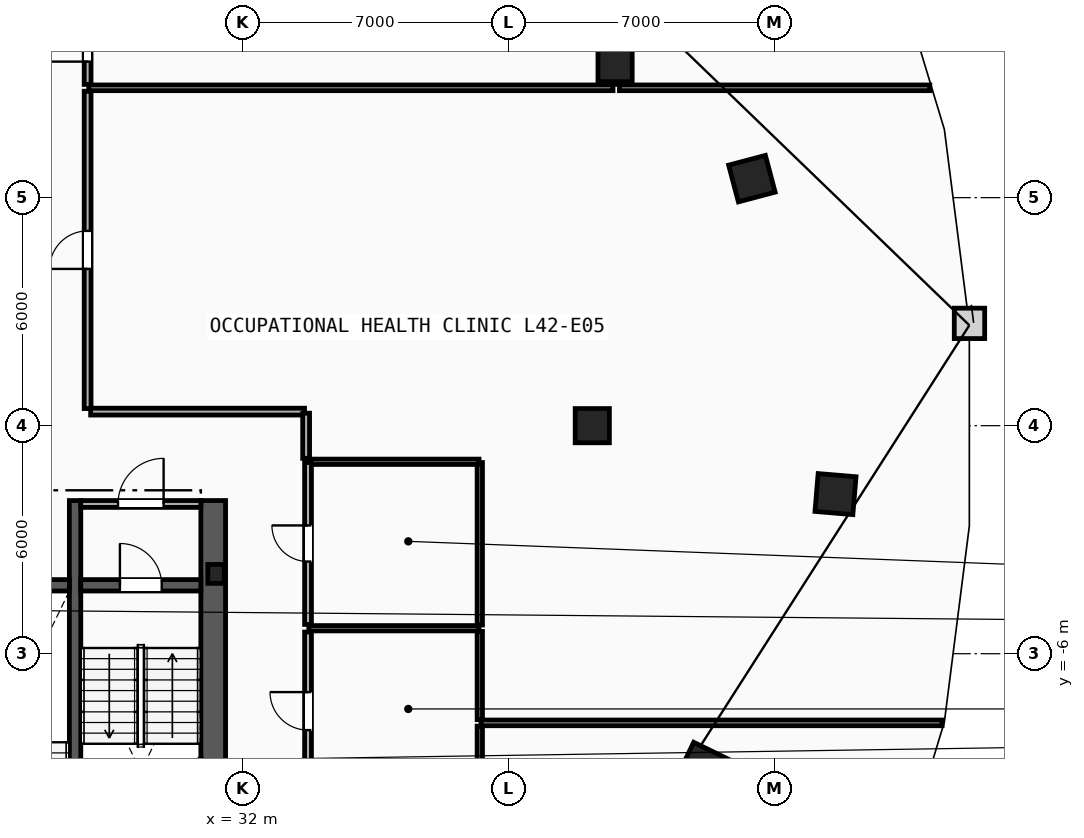
"""IFC4 building model, lengths in metres.
Left out: names, types, materials, properties, quantities, classifications, styles, units other than length and angle.
Written with IfcOpenShell. Run it as: python <this file> out.ifc"""

import sys

from ifc_helpers import new_model, si_unit, direction, frame, frame_2d, origin, origin_2d, place, context, subcontext, project, spatial, rectangle, i_section, extrude, element, fill, save


model = new_model("IFC4")
c1 = context("Model", 3, precision=1e-05, world=origin(), true_north=direction((0.0, 1.0)))
c2 = subcontext(c1, "Body", "Model", "MODEL_VIEW")
j1 = project(units=[si_unit("LENGTHUNIT", "METRE"), si_unit("PLANEANGLEUNIT", "RADIAN")], contexts=[c1])
p1 = place(None, origin())
s1 = spatial("IfcSite", under=j1, at=p1, CompositionType="ELEMENT")
p2 = place(p1, origin())
s2 = spatial("IfcBuilding", under=s1, at=p2, CompositionType="ELEMENT")
p3 = place(p2, frame((0.0, 0.0, 162.0)))
s3 = spatial("IfcBuildingStorey", under=s2, at=p3, CompositionType="ELEMENT", Elevation=162.0)
p4 = place(p3, frame((31.3, -3.9, 0.0), z_axis=(0.0, 0.0, 1.0), x_axis=(1.0, 0.0, 0.0)))
e1 = element("IfcColumn", 1, at=p4, inside=s3, PredefinedType="COLUMN", context=c2, shape_type="SweptSolid", body=[
    extrude(i_section(OverallWidth=0.432, OverallDepth=0.498, WebThickness=0.056, FlangeThickness=0.089, FilletRadius=0.018, at=origin_2d()), origin(), (0.0, 0.0, 1.0), 3.6),
])
for number, where, z_axis, x_axis in (
    (2, (41.2, 0.0, 0.0), (0.0, 0.0, 1.0), (1.0, 0.0, 0.0)),
    (3, (41.8, 9.5, 0.0), (0.0, 0.0, 1.0), (1.0, 0.0, 0.0)),
):
    element("IfcColumn", number, at=place(p3, frame(where, z_axis=z_axis, x_axis=x_axis)), inside=s3, PredefinedType="COLUMN", context=c2, shape_type="SweptSolid", body=[
        extrude(rectangle(XDim=0.9, YDim=0.9, at=origin_2d()), origin(), (0.0, 0.0, 1.0), 3.6),
    ])
for number, where, z_axis, x_axis in (
    (4, (44.1, -9.0, 0.0), (0.0, 0.0, 1.0), (0.437, 0.899, 0.0)),
    (5, (47.6, -1.8, 0.0), (0.0, 0.0, 1.0), (0.084, 0.997, 0.0)),
    (6, (45.4, 6.5, 0.0), (0.0, 0.0, 1.0), (-0.256, 0.967, 0.0)),
):
    element("IfcColumn", number, at=place(p3, frame(where, z_axis=z_axis, x_axis=x_axis)), inside=s3, PredefinedType="COLUMN", context=c2, shape_type="SweptSolid", body=[
        extrude(rectangle(XDim=1.0, YDim=1.0, at=origin_2d()), origin(), (0.0, 0.0, 1.0), 3.6),
    ])
p5 = place(p3, frame((31.225, -15.3, 0.0), z_axis=(0.0, 0.0, 1.0), x_axis=(0.0, 1.0, 0.0)))
e7 = element("IfcWall", 7, at=p5, inside=s3, PredefinedType="SHEAR", context=c2, shape_type="SweptSolid", body=[
    extrude(rectangle(XDim=13.33, YDim=0.65, at=frame_2d((6.665, 0.0))), origin(), (0.0, 0.0, 1.0), 3.36),
])
p6 = place(p3, frame((27.59, -12.65, 0.0), z_axis=(0.0, 0.0, 1.0), x_axis=(0.0, 1.0, 0.0)))
e8 = element("IfcWall", 8, at=p6, inside=s3, PredefinedType="SHEAR", context=c2, shape_type="SweptSolid", body=[
    extrude(rectangle(XDim=10.68, YDim=0.3, at=frame_2d((5.34, 0.0))), origin(), (0.0, 0.0, 1.0), 3.36),
])
p7 = place(p3, frame((27.74, -4.2, 0.0), z_axis=(0.0, 0.0, 1.0), x_axis=(1.0, 0.0, 0.0)))
e9 = element("IfcWall", 9, at=p7, inside=s3, PredefinedType="SHEAR", context=c2, shape_type="SweptSolid", body=[
    extrude(rectangle(XDim=3.16, YDim=0.3, at=frame_2d((1.58, 0.0))), origin(), (0.0, 0.0, 1.0), 3.36),
])
p8 = place(p7, frame((1.03, 0.0, 0.0)))
e10 = element("IfcOpeningElement", 10, at=p8, cuts=e9, PredefinedType="OPENING", context=c2, shape_type="SweptSolid", body=[
    extrude(rectangle(XDim=1.1, YDim=2.15, at=frame_2d((0.55, 1.075))), frame((0.0, 0.16, 0.0), z_axis=(0.0, -1.0, 0.0), x_axis=(1.0, 0.0, 0.0)), (0.0, 0.0, 1.0), 0.32),
])
p9 = place(p3, frame((24.28, -4.2, 0.0), z_axis=(0.0, 0.0, 1.0), x_axis=(1.0, 0.0, 0.0)))
e11 = element("IfcWall", 11, at=p9, inside=s3, PredefinedType="SHEAR", context=c2, shape_type="SweptSolid", body=[
    extrude(rectangle(XDim=3.16, YDim=0.3, at=frame_2d((1.58, 0.0))), origin(), (0.0, 0.0, 1.0), 3.36),
])
p10 = place(p3, frame((27.74, -2.06, 0.0), z_axis=(0.0, 0.0, 1.0), x_axis=(1.0, 0.0, 0.0)))
e12 = element("IfcWall", 12, at=p10, inside=s3, PredefinedType="PARTITIONING", context=c2, shape_type="SweptSolid", body=[
    extrude(rectangle(XDim=3.16, YDim=0.18, at=frame_2d((1.58, 0.0))), origin(), (0.0, 0.0, 1.0), 3.36),
])
p11 = place(p10, frame((0.98, 0.0, 0.0)))
e13 = element("IfcOpeningElement", 13, at=p11, cuts=e12, PredefinedType="OPENING", context=c2, shape_type="SweptSolid", body=[
    extrude(rectangle(XDim=1.2, YDim=2.15, at=frame_2d((0.6, 1.075))), frame((0.0, 0.1, 0.0), z_axis=(0.0, -1.0, 0.0), x_axis=(1.0, 0.0, 0.0)), (0.0, 0.0, 1.0), 0.2),
])
p12 = place(p3, frame((38.24, -9.59, 0.0), z_axis=(0.0, 0.0, 1.0), x_axis=(0.0, 1.0, 0.0)))
e14 = element("IfcWall", 14, at=p12, inside=s3, PredefinedType="PARTITIONING", context=c2, shape_type="SweptSolid", body=[
    extrude(rectangle(XDim=1.685, YDim=0.14, at=frame_2d((0.843, 0.0))), origin(), (0.0, 0.0, 1.0), 3.36),
])
p13 = place(p3, frame((38.24, -7.735, 0.0), z_axis=(0.0, 0.0, 1.0), x_axis=(0.0, 1.0, 0.0)))
e15 = element("IfcWall", 15, at=p13, inside=s3, PredefinedType="PARTITIONING", context=c2, shape_type="SweptSolid", body=[
    extrude(rectangle(XDim=2.32, YDim=0.14, at=frame_2d((1.16, 0.0))), origin(), (0.0, 0.0, 1.0), 3.36),
])
p14 = place(p3, frame((38.24, -5.245, 0.0), z_axis=(0.0, 0.0, 1.0), x_axis=(0.0, 1.0, 0.0)))
e16 = element("IfcWall", 16, at=p14, inside=s3, PredefinedType="PARTITIONING", context=c2, shape_type="SweptSolid", body=[
    extrude(rectangle(XDim=4.275, YDim=0.14, at=frame_2d((2.138, 0.0))), origin(), (0.0, 0.0, 1.0), 3.36),
])
for number, where, z_axis, x_axis in (
    (17, (33.74, -0.95, 0.0), (0.0, 0.0, 1.0), (1.0, 0.0, 0.0)),
    (18, (33.74, -5.33, 0.0), (0.0, 0.0, 1.0), (1.0, 0.0, 0.0)),
):
    element("IfcWall", number, at=place(p3, frame(where, z_axis=z_axis, x_axis=x_axis)), inside=s3, PredefinedType="PARTITIONING", context=c2, shape_type="SweptSolid", body=[
        extrude(rectangle(XDim=4.48, YDim=0.14, at=frame_2d((2.24, 0.0))), origin(), (0.0, 0.0, 1.0), 3.36),
    ])
p15 = place(p3, frame((33.72, -5.23, 0.0), z_axis=(0.0, 0.0, 1.0), x_axis=(0.0, 1.0, 0.0)))
e19 = element("IfcWall", 19, at=p15, inside=s3, PredefinedType="PARTITIONING", context=c2, shape_type="SweptSolid", body=[
    extrude(rectangle(XDim=4.26, YDim=0.18, at=frame_2d((2.13, 0.0))), origin(), (0.0, 0.0, 1.0), 3.36),
])
p16 = place(p15, frame((1.655, 0.0, 0.0)))
e20 = element("IfcOpeningElement", 20, at=p16, cuts=e19, PredefinedType="OPENING", context=c2, shape_type="SweptSolid", body=[
    extrude(rectangle(XDim=0.95, YDim=2.1, at=frame_2d((0.475, 1.05))), frame((0.0, 0.1, 0.0), z_axis=(0.0, -1.0, 0.0), x_axis=(1.0, 0.0, 0.0)), (0.0, 0.0, 1.0), 0.2),
])
p17 = place(p3, frame((33.72, -9.59, 0.0), z_axis=(0.0, 0.0, 1.0), x_axis=(0.0, 1.0, 0.0)))
e21 = element("IfcWall", 21, at=p17, inside=s3, PredefinedType="PARTITIONING", context=c2, shape_type="SweptSolid", body=[
    extrude(rectangle(XDim=4.16, YDim=0.18, at=frame_2d((2.08, 0.0))), origin(), (0.0, 0.0, 1.0), 3.36),
])
p18 = place(p17, frame((1.58, 0.0, 0.0)))
e22 = element("IfcOpeningElement", 22, at=p18, cuts=e21, PredefinedType="OPENING", context=c2, shape_type="SweptSolid", body=[
    extrude(rectangle(XDim=1.0, YDim=2.15, at=frame_2d((0.5, 1.075))), frame((0.0, 0.1, 0.0), z_axis=(0.0, -1.0, 0.0), x_axis=(1.0, 0.0, 0.0)), (0.0, 0.0, 1.0), 0.2),
])
p19 = place(p3, frame((27.95, 8.89, 0.0), z_axis=(0.0, 0.0, 1.0), x_axis=(1.0, 0.0, 0.0)))
e23 = element("IfcWall", 23, at=p19, inside=s3, PredefinedType="PARTITIONING", context=c2, shape_type="SweptSolid", body=[
    extrude(rectangle(XDim=13.795, YDim=0.15, at=frame_2d((6.897, 0.0))), origin(), (0.0, 0.0, 1.0), 3.36),
])
p20 = place(p3, frame((41.915, 8.89, 0.0), z_axis=(0.0, 0.0, 1.0), x_axis=(1.0, 0.0, 0.0)))
e24 = element("IfcWall", 24, at=p20, inside=s3, PredefinedType="PARTITIONING", context=c2, shape_type="SweptSolid", body=[
    extrude(rectangle(XDim=8.167, YDim=0.15, at=frame_2d((4.083, 0.0))), origin(), (0.0, 0.0, 1.0), 3.36),
])
p21 = place(p3, frame((38.27, -7.82, 0.0), z_axis=(0.0, 0.0, 1.0), x_axis=(1.0, 0.0, 0.0)))
e25 = element("IfcWall", 25, at=p21, inside=s3, PredefinedType="PARTITIONING", context=c2, shape_type="SweptSolid", body=[
    extrude(rectangle(XDim=12.136, YDim=0.15, at=frame_2d((6.068, 0.0))), origin(), (0.0, 0.0, 1.0), 3.36),
])
p22 = place(p3, frame((27.92, 0.45, 0.0), z_axis=(0.0, 0.0, 1.0), x_axis=(0.0, 1.0, 0.0)))
e26 = element("IfcWall", 26, at=p22, inside=s3, PredefinedType="PARTITIONING", context=c2, shape_type="SweptSolid", body=[
    extrude(rectangle(XDim=8.35, YDim=0.18, at=frame_2d((4.175, 0.0))), origin(), (0.0, 0.0, 1.0), 3.36),
])
p23 = place(p22, frame((3.675, 0.0, 0.0)))
e27 = element("IfcOpeningElement", 27, at=p23, cuts=e26, PredefinedType="OPENING", context=c2, shape_type="SweptSolid", body=[
    extrude(rectangle(XDim=1.0, YDim=2.15, at=frame_2d((0.5, 1.075))), frame((0.0, 0.1, 0.0), z_axis=(0.0, -1.0, 0.0), x_axis=(1.0, 0.0, 0.0)), (0.0, 0.0, 1.0), 0.2),
])
p24 = place(p3, frame((33.628, 0.37, 0.0), z_axis=(0.0, 0.0, 1.0), x_axis=(-1.0, 0.0, 0.0)))
e28 = element("IfcWall", 28, at=p24, inside=s3, PredefinedType="PARTITIONING", context=c2, shape_type="SweptSolid", body=[
    extrude(rectangle(XDim=5.628, YDim=0.18, at=frame_2d((2.814, 0.0))), origin(), (0.0, 0.0, 1.0), 3.36),
])
p25 = place(p3, frame((33.67, -0.859, 0.0), z_axis=(0.0, 0.0, 1.0), x_axis=(0.0, 1.0, 0.0)))
e29 = element("IfcWall", 29, at=p25, inside=s3, PredefinedType="PARTITIONING", context=c2, shape_type="SweptSolid", body=[
    extrude(rectangle(XDim=1.187, YDim=0.18, at=frame_2d((0.594, 0.0))), origin(), (0.0, 0.0, 1.0), 3.36),
])
p26 = place(p3, frame((27.92, 8.98, 0.0), z_axis=(0.0, 0.0, 1.0), x_axis=(0.0, 1.0, 0.0)))
e30 = element("IfcWall", 30, at=p26, inside=s3, PredefinedType="PARTITIONING", context=c2, shape_type="SweptSolid", body=[
    extrude(rectangle(XDim=2.198, YDim=0.18, at=frame_2d((1.099, 0.0))), origin(), (0.0, 0.0, 1.0), 3.36),
])
p27 = place(p26, frame((0.599, 0.0, 0.0)))
e31 = element("IfcOpeningElement", 31, at=p27, cuts=e30, PredefinedType="OPENING", context=c2, shape_type="SweptSolid", body=[
    extrude(rectangle(XDim=1.0, YDim=2.15, at=frame_2d((0.5, 1.075))), frame((0.0, 0.1, 0.0), z_axis=(0.0, -1.0, 0.0), x_axis=(1.0, 0.0, 0.0)), (0.0, 0.0, 1.0), 0.2),
])
p28 = place(p3, frame((41.83, 8.98, 0.0), z_axis=(0.0, 0.0, 1.0), x_axis=(0.0, 1.0, 0.0)))
e32 = element("IfcWall", 32, at=p28, inside=s3, PredefinedType="PARTITIONING", context=c2, shape_type="SweptSolid", body=[
    extrude(rectangle(XDim=11.638, YDim=0.125, at=frame_2d((5.819, 0.0))), origin(), (0.0, 0.0, 1.0), 2.897),
])
p29 = place(p28, frame((3.76, 0.0, 0.0)))
e33 = element("IfcOpeningElement", 33, at=p29, cuts=e32, PredefinedType="OPENING", context=c2, shape_type="SweptSolid", body=[
    extrude(rectangle(XDim=1.0, YDim=2.15, at=frame_2d((0.5, 1.075))), frame((0.0, 0.073, 0.0), z_axis=(0.0, -1.0, 0.0), x_axis=(1.0, 0.0, 0.0)), (0.0, 0.0, 1.0), 0.145),
])
p30 = place(p8, origin())
e34 = element("IfcDoor", 34, at=p30, inside=s3, OperationType="SINGLE_SWING_LEFT", PredefinedType="DOOR", context=c2, shape_type="SweptSolid", body=[
    extrude(rectangle(XDim=1.1, YDim=2.15, at=frame_2d((0.55, 1.075))), frame((0.0, 0.025, 0.0), z_axis=(0.0, -1.0, 0.0), x_axis=(1.0, 0.0, 0.0)), (0.0, 0.0, 1.0), 0.05),
])
fill(e10, e34)
p31 = place(p11, origin())
e35 = element("IfcDoor", 35, at=p31, inside=s3, OperationType="SINGLE_SWING_RIGHT", PredefinedType="DOOR", context=c2, shape_type="SweptSolid", body=[
    extrude(rectangle(XDim=1.2, YDim=2.15, at=frame_2d((0.6, 1.075))), frame((0.0, 0.025, 0.0), z_axis=(0.0, -1.0, 0.0), x_axis=(1.0, 0.0, 0.0)), (0.0, 0.0, 1.0), 0.05),
])
fill(e13, e35)
p32 = place(p23, origin())
e36 = element("IfcDoor", 36, at=p32, inside=s3, OperationType="SINGLE_SWING_LEFT", PredefinedType="DOOR", context=c2, shape_type="SweptSolid", body=[
    extrude(rectangle(XDim=1.0, YDim=2.15, at=frame_2d((0.5, 1.075))), frame((0.0, 0.025, 0.0), z_axis=(0.0, -1.0, 0.0), x_axis=(1.0, 0.0, 0.0)), (0.0, 0.0, 1.0), 0.05),
])
fill(e27, e36)
p33 = place(p16, origin())
e37 = element("IfcDoor", 37, at=p33, inside=s3, OperationType="SINGLE_SWING_RIGHT", PredefinedType="DOOR", context=c2, shape_type="SweptSolid", body=[
    extrude(rectangle(XDim=0.95, YDim=2.1, at=frame_2d((0.475, 1.05))), frame((0.0, 0.025, 0.0), z_axis=(0.0, -1.0, 0.0), x_axis=(1.0, 0.0, 0.0)), (0.0, 0.0, 1.0), 0.05),
])
fill(e20, e37)
p34 = place(p18, origin())
e38 = element("IfcDoor", 38, at=p34, inside=s3, OperationType="SINGLE_SWING_RIGHT", PredefinedType="DOOR", context=c2, shape_type="SweptSolid", body=[
    extrude(rectangle(XDim=1.0, YDim=2.15, at=frame_2d((0.5, 1.075))), frame((0.0, 0.025, 0.0), z_axis=(0.0, -1.0, 0.0), x_axis=(1.0, 0.0, 0.0)), (0.0, 0.0, 1.0), 0.05),
])
fill(e22, e38)
p35 = place(p27, origin())
e39 = element("IfcDoor", 39, at=p35, inside=s3, OperationType="SINGLE_SWING_LEFT", PredefinedType="DOOR", context=c2, shape_type="SweptSolid", body=[
    extrude(rectangle(XDim=1.0, YDim=2.15, at=frame_2d((0.5, 1.075))), frame((0.0, 0.025, 0.0), z_axis=(0.0, -1.0, 0.0), x_axis=(1.0, 0.0, 0.0)), (0.0, 0.0, 1.0), 0.05),
])
fill(e31, e39)
save(model, sys.argv[1])
